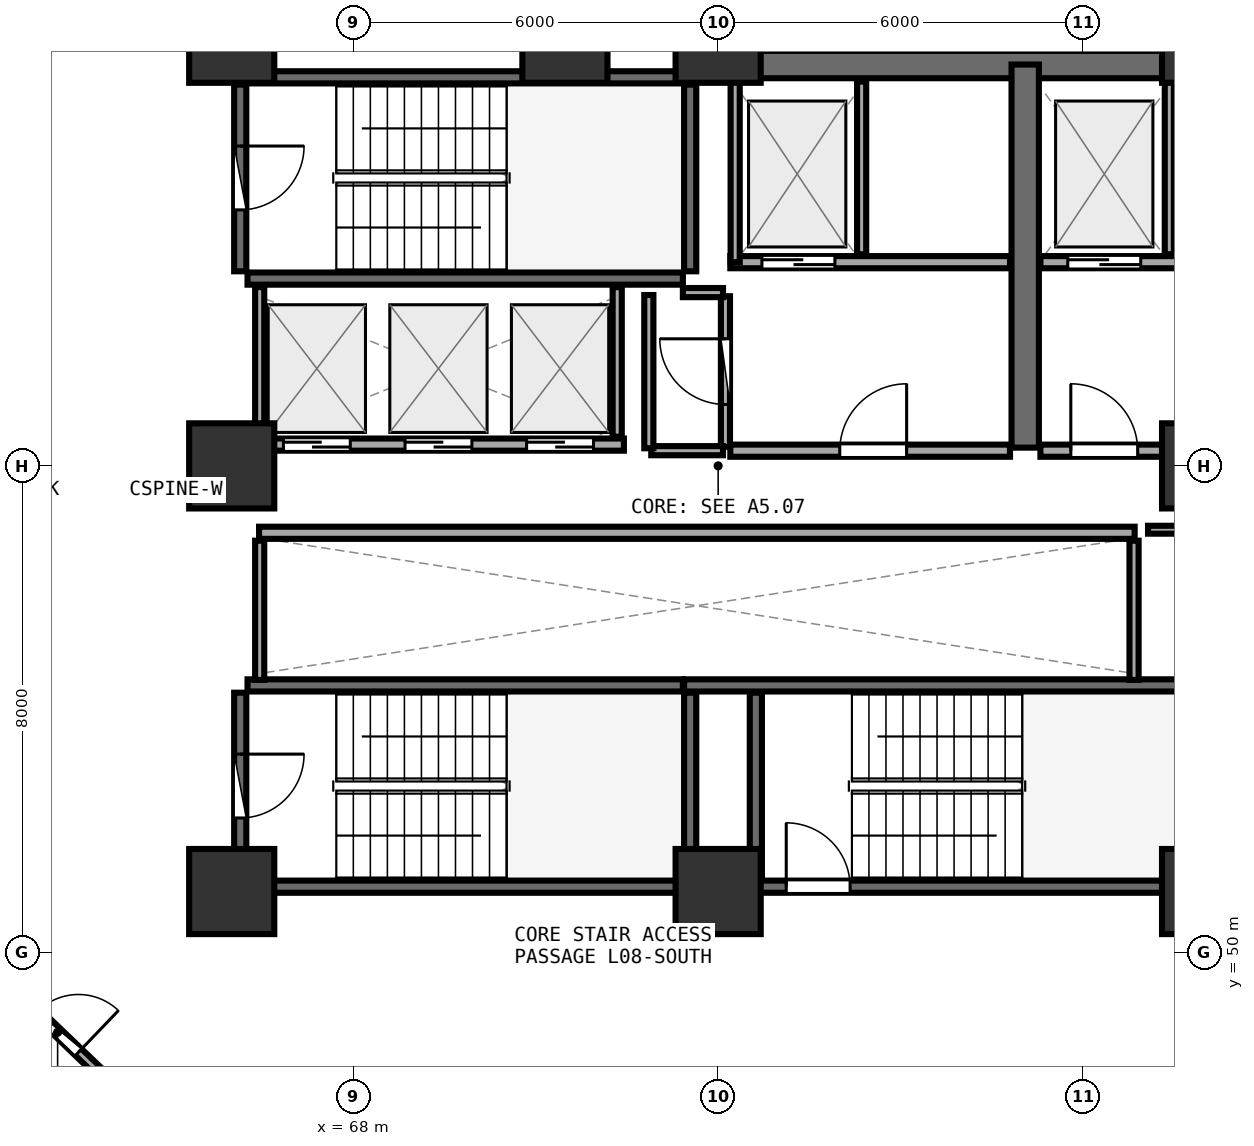
"""IFC4 building model, lengths in metres.
Left out: names, types, materials, properties, quantities, classifications, styles, units other than length and angle.
Written with IfcOpenShell. Run it as: python <this file> out.ifc"""

import sys

from ifc_helpers import new_model, si_unit, direction, frame, frame_2d, origin, origin_2d, place, context, subcontext, project, spatial, rectangle, extrude, element, fill, save


model = new_model("IFC4")
c1 = context("Model", 3, precision=1e-05, world=origin(), true_north=direction((0.0, 1.0)))
c2 = subcontext(c1, "Body", "Model", "MODEL_VIEW")
j1 = project(units=[si_unit("LENGTHUNIT", "METRE"), si_unit("PLANEANGLEUNIT", "RADIAN")], contexts=[c1])
p1 = place(None, origin())
s1 = spatial("IfcSite", under=j1, at=p1, CompositionType="ELEMENT")
p2 = place(p1, origin())
s2 = spatial("IfcBuilding", under=s1, at=p2, CompositionType="ELEMENT")
p3 = place(p2, frame((0.0, 0.0, 33.75)))
s3 = spatial("IfcBuildingStorey", under=s2, at=p3, CompositionType="ELEMENT", Elevation=33.75)
for number, where, z_axis, x_axis in (
    (1, (66.0, 51.0, 0.0), (0.0, 0.0, 1.0), (1.0, 0.0, 0.0)),
    (2, (74.0, 51.0, 0.0), (0.0, 0.0, 1.0), (1.0, 0.0, 0.0)),
    (3, (82.0, 51.0, 0.0), (0.0, 0.0, 1.0), (1.0, 0.0, 0.0)),
    (4, (82.0, 58.0, 0.0), (0.0, 0.0, 1.0), (1.0, 0.0, 0.0)),
    (5, (82.0, 65.0, 0.0), (0.0, 0.0, 1.0), (1.0, 0.0, 0.0)),
    (6, (74.0, 65.0, 0.0), (0.0, 0.0, 1.0), (1.0, 0.0, 0.0)),
    (7, (71.48, 65.0, 0.0), (0.0, 0.0, 1.0), (1.0, 0.0, 0.0)),
    (8, (66.0, 65.0, 0.0), (0.0, 0.0, 1.0), (1.0, 0.0, 0.0)),
    (9, (66.0, 58.0, 0.0), (0.0, 0.0, 1.0), (1.0, 0.0, 0.0)),
):
    element("IfcColumn", number, at=place(p3, frame(where, z_axis=z_axis, x_axis=x_axis)), inside=s3, PredefinedType="PILASTER", context=c2, shape_type="SweptSolid", body=[
        extrude(rectangle(XDim=1.4, YDim=1.4, at=origin_2d()), origin(), (0.0, 0.0, 1.0), 3.75),
    ])
p4 = place(p3, frame((66.26, 61.08, 0.0), z_axis=(0.0, 0.0, 1.0), x_axis=(1.0, 0.0, 0.0)))
e10 = element("IfcWall", 10, at=p4, inside=s3, PredefinedType="SHEAR", context=c2, shape_type="SweptSolid", body=[
    extrude(rectangle(XDim=7.16, YDim=0.2, at=frame_2d((3.58, 0.0))), origin(), (0.0, 0.0, 1.0), 3.49),
])
p5 = place(p3, frame((73.54, 61.2, 0.0), z_axis=(0.0, 0.0, 1.0), x_axis=(0.0, 1.0, 0.0)))
e11 = element("IfcWall", 11, at=p5, inside=s3, PredefinedType="SHEAR", context=c2, shape_type="SweptSolid", body=[
    extrude(rectangle(XDim=3.07, YDim=0.2, at=frame_2d((1.535, 0.0))), origin(), (0.0, 0.0, 1.0), 3.49),
])
p6 = place(p3, frame((73.42, 64.39, 0.0), z_axis=(0.0, 0.0, 1.0), x_axis=(-1.0, 0.0, 0.0)))
e12 = element("IfcWall", 12, at=p6, inside=s3, PredefinedType="SHEAR", context=c2, shape_type="SweptSolid", body=[
    extrude(rectangle(XDim=7.16, YDim=0.2, at=frame_2d((3.58, 0.0))), origin(), (0.0, 0.0, 1.0), 3.49),
])
p7 = place(p3, frame((66.14, 64.27, 0.0), z_axis=(0.0, 0.0, 1.0), x_axis=(0.0, -1.0, 0.0)))
e13 = element("IfcWall", 13, at=p7, inside=s3, PredefinedType="SHEAR", context=c2, shape_type="SweptSolid", body=[
    extrude(rectangle(XDim=3.07, YDim=0.2, at=frame_2d((1.535, 0.0))), origin(), (0.0, 0.0, 1.0), 3.49),
])
p8 = place(p7, frame((1.01, 0.0, 0.0)))
e14 = element("IfcOpeningElement", 14, at=p8, cuts=e13, PredefinedType="OPENING", context=c2, shape_type="SweptSolid", body=[
    extrude(rectangle(XDim=1.05, YDim=2.1, at=frame_2d((0.525, 1.05))), frame((0.0, 0.11, 0.0), z_axis=(0.0, -1.0, 0.0), x_axis=(1.0, 0.0, 0.0)), (0.0, 0.0, 1.0), 0.22),
])
p9 = place(p3, frame((74.0, 51.08, 0.0), z_axis=(0.0, 0.0, 1.0), x_axis=(1.0, 0.0, 0.0)))
e15 = element("IfcWall", 15, at=p9, inside=s3, PredefinedType="SHEAR", context=c2, shape_type="SweptSolid", body=[
    extrude(rectangle(XDim=7.9, YDim=0.2, at=frame_2d((3.95, 0.0))), origin(), (0.0, 0.0, 1.0), 3.49),
])
p10 = place(p9, frame((1.12, 0.0, 0.0)))
e16 = element("IfcOpeningElement", 16, at=p10, cuts=e15, PredefinedType="OPENING", context=c2, shape_type="SweptSolid", body=[
    extrude(rectangle(XDim=1.05, YDim=2.1, at=frame_2d((0.525, 1.05))), frame((0.0, 0.11, 0.0), z_axis=(0.0, -1.0, 0.0), x_axis=(1.0, 0.0, 0.0)), (0.0, 0.0, 1.0), 0.22),
])
p11 = place(p3, frame((81.9, 54.39, 0.0), z_axis=(0.0, 0.0, 1.0), x_axis=(-1.0, 0.0, 0.0)))
e17 = element("IfcWall", 17, at=p11, inside=s3, PredefinedType="SHEAR", context=c2, shape_type="SweptSolid", body=[
    extrude(rectangle(XDim=8.46, YDim=0.2, at=frame_2d((4.23, 0.0))), origin(), (0.0, 0.0, 1.0), 3.49),
])
p12 = place(p3, frame((74.62, 54.27, 0.0), z_axis=(0.0, 0.0, 1.0), x_axis=(0.0, -1.0, 0.0)))
e18 = element("IfcWall", 18, at=p12, inside=s3, PredefinedType="SHEAR", context=c2, shape_type="SweptSolid", body=[
    extrude(rectangle(XDim=3.07, YDim=0.2, at=frame_2d((1.535, 0.0))), origin(), (0.0, 0.0, 1.0), 3.49),
])
p13 = place(p3, frame((66.26, 51.08, 0.0), z_axis=(0.0, 0.0, 1.0), x_axis=(1.0, 0.0, 0.0)))
e19 = element("IfcWall", 19, at=p13, inside=s3, PredefinedType="SHEAR", context=c2, shape_type="SweptSolid", body=[
    extrude(rectangle(XDim=7.16, YDim=0.2, at=frame_2d((3.58, 0.0))), origin(), (0.0, 0.0, 1.0), 3.49),
])
p14 = place(p3, frame((73.54, 51.2, 0.0), z_axis=(0.0, 0.0, 1.0), x_axis=(0.0, 1.0, 0.0)))
e20 = element("IfcWall", 20, at=p14, inside=s3, PredefinedType="SHEAR", context=c2, shape_type="SweptSolid", body=[
    extrude(rectangle(XDim=3.07, YDim=0.2, at=frame_2d((1.535, 0.0))), origin(), (0.0, 0.0, 1.0), 3.49),
])
p15 = place(p3, frame((73.42, 54.39, 0.0), z_axis=(0.0, 0.0, 1.0), x_axis=(-1.0, 0.0, 0.0)))
e21 = element("IfcWall", 21, at=p15, inside=s3, PredefinedType="SHEAR", context=c2, shape_type="SweptSolid", body=[
    extrude(rectangle(XDim=7.16, YDim=0.2, at=frame_2d((3.58, 0.0))), origin(), (0.0, 0.0, 1.0), 3.49),
])
p16 = place(p3, frame((66.14, 54.27, 0.0), z_axis=(0.0, 0.0, 1.0), x_axis=(0.0, -1.0, 0.0)))
e22 = element("IfcWall", 22, at=p16, inside=s3, PredefinedType="SHEAR", context=c2, shape_type="SweptSolid", body=[
    extrude(rectangle(XDim=3.07, YDim=0.2, at=frame_2d((1.535, 0.0))), origin(), (0.0, 0.0, 1.0), 3.49),
])
p17 = place(p16, frame((1.01, 0.0, 0.0)))
e23 = element("IfcOpeningElement", 23, at=p17, cuts=e22, PredefinedType="OPENING", context=c2, shape_type="SweptSolid", body=[
    extrude(rectangle(XDim=1.05, YDim=2.1, at=frame_2d((0.525, 1.05))), frame((0.0, 0.11, 0.0), z_axis=(0.0, -1.0, 0.0), x_axis=(1.0, 0.0, 0.0)), (0.0, 0.0, 1.0), 0.22),
])
p18 = place(p3, frame((74.0, 64.6, 0.0), z_axis=(0.0, 0.0, 1.0), x_axis=(1.0, 0.0, 0.0)))
e24 = element("IfcWall", 24, at=p18, inside=s3, PredefinedType="SHEAR", context=c2, shape_type="SweptSolid", body=[
    extrude(rectangle(XDim=8.0, YDim=0.45, at=frame_2d((4.0, 0.0))), origin(), (0.0, 0.0, 1.0), 3.49),
])
p19 = place(p3, frame((79.05, 58.3, 0.0), z_axis=(0.0, 0.0, 1.0), x_axis=(0.0, 1.0, 0.0)))
e25 = element("IfcWall", 25, at=p19, inside=s3, PredefinedType="SHEAR", context=c2, shape_type="SweptSolid", body=[
    extrude(rectangle(XDim=6.3, YDim=0.45, at=frame_2d((3.15, 0.0))), origin(), (0.0, 0.0, 1.0), 3.49),
])
p20 = place(p3, frame((74.2, 61.35, 0.0), z_axis=(0.0, 0.0, 1.0), x_axis=(1.0, 0.0, 0.0)))
e26 = element("IfcWall", 26, at=p20, inside=s3, PredefinedType="SOLIDWALL", context=c2, shape_type="SweptSolid", body=[
    extrude(rectangle(XDim=4.6, YDim=0.2, at=frame_2d((2.3, 0.0))), origin(), (0.0, 0.0, 1.0), 3.48),
])
p21 = place(p20, frame((0.52, 0.0, 0.0)))
e27 = element("IfcOpeningElement", 27, at=p21, cuts=e26, PredefinedType="OPENING", context=c2, shape_type="SweptSolid", body=[
    extrude(rectangle(XDim=1.2, YDim=2.15, at=frame_2d((0.6, 1.075))), frame((0.0, 0.11, 0.0), z_axis=(0.0, -1.0, 0.0), x_axis=(1.0, 0.0, 0.0)), (0.0, 0.0, 1.0), 0.22),
])
p22 = place(p3, frame((74.28, 61.35, 0.0), z_axis=(0.0, 0.0, 1.0), x_axis=(0.0, 1.0, 0.0)))
e28 = element("IfcWall", 28, at=p22, inside=s3, PredefinedType="PARTITIONING", context=c2, shape_type="SweptSolid", body=[
    extrude(rectangle(XDim=2.97, YDim=0.15, at=frame_2d((1.485, 0.0))), origin(), (0.0, 0.0, 1.0), 3.48),
])
p23 = place(p3, frame((76.36, 61.48, 0.0), z_axis=(0.0, 0.0, 1.0), x_axis=(0.0, 1.0, 0.0)))
e29 = element("IfcWall", 29, at=p23, inside=s3, PredefinedType="PARTITIONING", context=c2, shape_type="SweptSolid", body=[
    extrude(rectangle(XDim=2.84, YDim=0.15, at=frame_2d((1.42, 0.0))), origin(), (0.0, 0.0, 1.0), 3.48),
])
p24 = place(p3, frame((79.3, 61.35, 0.0), z_axis=(0.0, 0.0, 1.0), x_axis=(1.0, 0.0, 0.0)))
e30 = element("IfcWall", 30, at=p24, inside=s3, PredefinedType="SOLIDWALL", context=c2, shape_type="SweptSolid", body=[
    extrude(rectangle(XDim=4.0, YDim=0.2, at=frame_2d((2.0, 0.0))), origin(), (0.0, 0.0, 1.0), 2.775),
])
p25 = place(p24, frame((0.45, 0.0, 0.0)))
e31 = element("IfcOpeningElement", 31, at=p25, cuts=e30, PredefinedType="OPENING", context=c2, shape_type="SweptSolid", body=[
    extrude(rectangle(XDim=1.2, YDim=2.15, at=frame_2d((0.6, 1.075))), frame((0.0, 0.11, 0.0), z_axis=(0.0, -1.0, 0.0), x_axis=(1.0, 0.0, 0.0)), (0.0, 0.0, 1.0), 0.22),
])
p26 = place(p3, frame((81.42, 61.48, 0.0), z_axis=(0.0, 0.0, 1.0), x_axis=(0.0, 1.0, 0.0)))
e32 = element("IfcWall", 32, at=p26, inside=s3, PredefinedType="PARTITIONING", context=c2, shape_type="SweptSolid", body=[
    extrude(rectangle(XDim=2.84, YDim=0.15, at=frame_2d((1.42, 0.0))), origin(), (0.0, 0.0, 1.0), 3.48),
])
p27 = place(p3, frame((74.2, 58.25, 0.0), z_axis=(0.0, 0.0, 1.0), x_axis=(1.0, 0.0, 0.0)))
e33 = element("IfcWall", 33, at=p27, inside=s3, PredefinedType="SOLIDWALL", context=c2, shape_type="SweptSolid", body=[
    extrude(rectangle(XDim=4.6, YDim=0.2, at=frame_2d((2.3, 0.0))), origin(), (0.0, 0.0, 1.0), 3.48),
])
p28 = place(p27, frame((1.8, 0.0, 0.0)))
e34 = element("IfcOpeningElement", 34, at=p28, cuts=e33, PredefinedType="OPENING", context=c2, shape_type="SweptSolid", body=[
    extrude(rectangle(XDim=1.1, YDim=2.1, at=frame_2d((0.55, 1.05))), frame((0.0, 0.11, 0.0), z_axis=(0.0, -1.0, 0.0), x_axis=(1.0, 0.0, 0.0)), (0.0, 0.0, 1.0), 0.22),
])
p29 = place(p3, frame((79.3, 58.25, 0.0), z_axis=(0.0, 0.0, 1.0), x_axis=(1.0, 0.0, 0.0)))
e35 = element("IfcWall", 35, at=p29, inside=s3, PredefinedType="SOLIDWALL", context=c2, shape_type="SweptSolid", body=[
    extrude(rectangle(XDim=4.0, YDim=0.2, at=frame_2d((2.0, 0.0))), origin(), (0.0, 0.0, 1.0), 2.775),
])
p30 = place(p29, frame((0.5, 0.0, 0.0)))
e36 = element("IfcOpeningElement", 36, at=p30, cuts=e35, PredefinedType="OPENING", context=c2, shape_type="SweptSolid", body=[
    extrude(rectangle(XDim=1.1, YDim=2.1, at=frame_2d((0.55, 1.05))), frame((0.0, 0.11, 0.0), z_axis=(0.0, -1.0, 0.0), x_axis=(1.0, 0.0, 0.0)), (0.0, 0.0, 1.0), 0.22),
])
p31 = place(p3, frame((66.45, 58.35, 0.0), z_axis=(0.0, 0.0, 1.0), x_axis=(1.0, 0.0, 0.0)))
e37 = element("IfcWall", 37, at=p31, inside=s3, PredefinedType="SOLIDWALL", context=c2, shape_type="SweptSolid", body=[
    extrude(rectangle(XDim=6.0, YDim=0.2, at=frame_2d((3.0, 0.0))), origin(), (0.0, 0.0, 1.0), 3.48),
])
p32 = place(p31, frame((0.4, 0.0, 0.0)))
e38 = element("IfcOpeningElement", 38, at=p32, cuts=e37, PredefinedType="OPENING", context=c2, shape_type="SweptSolid", body=[
    extrude(rectangle(XDim=1.1, YDim=2.1, at=frame_2d((0.55, 1.05))), frame((0.0, 0.11, 0.0), z_axis=(0.0, -1.0, 0.0), x_axis=(1.0, 0.0, 0.0)), (0.0, 0.0, 1.0), 0.22),
])
p33 = place(p31, frame((2.4, 0.0, 0.0)))
e39 = element("IfcOpeningElement", 39, at=p33, cuts=e37, PredefinedType="OPENING", context=c2, shape_type="SweptSolid", body=[
    extrude(rectangle(XDim=1.1, YDim=2.1, at=frame_2d((0.55, 1.05))), frame((0.0, 0.11, 0.0), z_axis=(0.0, -1.0, 0.0), x_axis=(1.0, 0.0, 0.0)), (0.0, 0.0, 1.0), 0.22),
])
p34 = place(p31, frame((4.4, 0.0, 0.0)))
e40 = element("IfcOpeningElement", 40, at=p34, cuts=e37, PredefinedType="OPENING", context=c2, shape_type="SweptSolid", body=[
    extrude(rectangle(XDim=1.1, YDim=2.1, at=frame_2d((0.55, 1.05))), frame((0.0, 0.11, 0.0), z_axis=(0.0, -1.0, 0.0), x_axis=(1.0, 0.0, 0.0)), (0.0, 0.0, 1.0), 0.22),
])
for number, where, z_axis, x_axis in (
    (41, (66.46, 58.48, 0.0), (0.0, 0.0, 1.0), (0.0, 1.0, 0.0)),
    (42, (72.34, 58.48, 0.0), (0.0, 0.0, 1.0), (0.0, 1.0, 0.0)),
):
    element("IfcWall", number, at=place(p3, frame(where, z_axis=z_axis, x_axis=x_axis)), inside=s3, PredefinedType="PARTITIONING", context=c2, shape_type="SweptSolid", body=[
        extrude(rectangle(XDim=2.46, YDim=0.15, at=frame_2d((1.23, 0.0))), origin(), (0.0, 0.0, 1.0), 3.48),
    ])
p35 = place(p3, frame((66.45, 56.9, 0.0), z_axis=(0.0, 0.0, 1.0), x_axis=(1.0, 0.0, 0.0)))
e43 = element("IfcWall", 43, at=p35, inside=s3, PredefinedType="SOLIDWALL", context=c2, shape_type="SweptSolid", body=[
    extrude(rectangle(XDim=14.4, YDim=0.2, at=frame_2d((7.2, 0.0))), origin(), (0.0, 0.0, 1.0), 3.48),
])
for number, where, z_axis, x_axis in (
    (44, (66.46, 54.48, 0.0), (0.0, 0.0, 1.0), (0.0, 1.0, 0.0)),
    (45, (80.84, 54.48, 0.0), (0.0, 0.0, 1.0), (0.0, 1.0, 0.0)),
):
    element("IfcWall", number, at=place(p3, frame(where, z_axis=z_axis, x_axis=x_axis)), inside=s3, PredefinedType="PARTITIONING", context=c2, shape_type="SweptSolid", body=[
        extrude(rectangle(XDim=2.29, YDim=0.15, at=frame_2d((1.145, 0.0))), origin(), (0.0, 0.0, 1.0), 3.48),
    ])
p36 = place(p3, frame((74.12, 58.31, 0.0), z_axis=(0.0, 0.0, 1.0), x_axis=(0.0, 1.0, 0.0)))
e46 = element("IfcWall", 46, at=p36, inside=s3, PredefinedType="PARTITIONING", context=c2, shape_type="SweptSolid", body=[
    extrude(rectangle(XDim=2.48, YDim=0.15, at=frame_2d((1.24, 0.0))), origin(), (0.0, 0.0, 1.0), 3.48),
])
p37 = place(p36, frame((0.7, 0.0, 0.0)))
e47 = element("IfcOpeningElement", 47, at=p37, cuts=e46, PredefinedType="OPENING", context=c2, shape_type="SweptSolid", body=[
    extrude(rectangle(XDim=1.08, YDim=2.1, at=frame_2d((0.54, 1.05))), frame((0.0, 0.085, 0.0), z_axis=(0.0, -1.0, 0.0), x_axis=(1.0, 0.0, 0.0)), (0.0, 0.0, 1.0), 0.17),
])
p38 = place(p3, frame((62.118, 49.663, 0.0), z_axis=(0.0, 0.0, 1.0), x_axis=(0.721698326825, -0.692207718144, 0.0)))
e48 = element("IfcWall", 48, at=p38, inside=s3, PredefinedType="PARTITIONING", context=c2, shape_type="SweptSolid", body=[
    extrude(rectangle(XDim=2.823, YDim=0.15, at=frame_2d((1.412, 0.0))), origin(), (0.0, 0.0, 1.0), 2.875),
])
p39 = place(p38, frame((0.936, 0.0, 0.0)))
e49 = element("IfcOpeningElement", 49, at=p39, cuts=e48, PredefinedType="OPENING", context=c2, shape_type="SweptSolid", body=[
    extrude(rectangle(XDim=0.95, YDim=2.08, at=frame_2d((0.475, 1.04))), frame((0.0, 0.085, 0.0), z_axis=(0.0, -1.0, 0.0), x_axis=(1.0, 0.0, 0.0)), (0.0, 0.0, 1.0), 0.17),
])
p40 = place(p3, frame((72.9, 58.25, 0.0), z_axis=(0.0, 0.0, 1.0), x_axis=(1.0, 0.0, 0.0)))
e50 = element("IfcWall", 50, at=p40, inside=s3, PredefinedType="PARTITIONING", context=c2, shape_type="SweptSolid", body=[
    extrude(rectangle(XDim=1.18, YDim=0.15, at=frame_2d((0.59, 0.0))), origin(), (0.0, 0.0, 1.0), 3.48),
])
p41 = place(p3, frame((74.08, 60.85, 0.0), z_axis=(0.0, 0.0, 1.0), x_axis=(-1.0, 0.0, 0.0)))
e51 = element("IfcWall", 51, at=p41, inside=s3, PredefinedType="PARTITIONING", context=c2, shape_type="SweptSolid", body=[
    extrude(rectangle(XDim=0.66, YDim=0.15, at=frame_2d((0.33, 0.0))), origin(), (0.0, 0.0, 1.0), 3.48),
])
p42 = place(p3, frame((72.86, 60.81, 0.0), z_axis=(0.0, 0.0, 1.0), x_axis=(0.0, -1.0, 0.0)))
e52 = element("IfcWall", 52, at=p42, inside=s3, PredefinedType="PARTITIONING", context=c2, shape_type="SweptSolid", body=[
    extrude(rectangle(XDim=2.52, YDim=0.15, at=frame_2d((1.26, 0.0))), origin(), (0.0, 0.0, 1.0), 3.48),
])
p43 = place(p3, frame((82.66, 56.95, 0.0), z_axis=(0.0, 0.0, 1.0), x_axis=(-1.0, 0.0, 0.0)))
e53 = element("IfcWall", 53, at=p43, inside=s3, PredefinedType="PLUMBINGWALL", context=c2, shape_type="SweptSolid", body=[
    extrude(rectangle(XDim=1.59, YDim=0.13, at=frame_2d((0.795, 0.0))), origin(), (0.0, 0.0, 1.0), 2.775),
])
p44 = place(p8, origin())
e54 = element("IfcDoor", 54, at=p44, inside=s3, OperationType="SINGLE_SWING_LEFT", PredefinedType="DOOR", context=c2, shape_type="SweptSolid", body=[
    extrude(rectangle(XDim=1.05, YDim=2.1, at=frame_2d((0.525, 1.05))), frame((0.0, 0.025, 0.0), z_axis=(0.0, -1.0, 0.0), x_axis=(1.0, 0.0, 0.0)), (0.0, 0.0, 1.0), 0.05),
])
fill(e14, e54)
p45 = place(p10, origin())
e55 = element("IfcDoor", 55, at=p45, inside=s3, OperationType="SINGLE_SWING_LEFT", PredefinedType="DOOR", context=c2, shape_type="SweptSolid", body=[
    extrude(rectangle(XDim=1.05, YDim=2.1, at=frame_2d((0.525, 1.05))), frame((0.0, 0.025, 0.0), z_axis=(0.0, -1.0, 0.0), x_axis=(1.0, 0.0, 0.0)), (0.0, 0.0, 1.0), 0.05),
])
fill(e16, e55)
p46 = place(p17, origin())
e56 = element("IfcDoor", 56, at=p46, inside=s3, OperationType="SINGLE_SWING_LEFT", PredefinedType="DOOR", context=c2, shape_type="SweptSolid", body=[
    extrude(rectangle(XDim=1.05, YDim=2.1, at=frame_2d((0.525, 1.05))), frame((0.0, 0.025, 0.0), z_axis=(0.0, -1.0, 0.0), x_axis=(1.0, 0.0, 0.0)), (0.0, 0.0, 1.0), 0.05),
])
fill(e23, e56)
p47 = place(p21, origin())
e57 = element("IfcDoor", 57, at=p47, inside=s3, OperationType="DOUBLE_DOOR_SLIDING", PredefinedType="DOOR", context=c2, shape_type="SweptSolid", body=[
    extrude(rectangle(XDim=1.2, YDim=2.15, at=frame_2d((0.6, 1.075))), frame((0.0, 0.025, 0.0), z_axis=(0.0, -1.0, 0.0), x_axis=(1.0, 0.0, 0.0)), (0.0, 0.0, 1.0), 0.05),
])
fill(e27, e57)
p48 = place(p25, origin())
e58 = element("IfcDoor", 58, at=p48, inside=s3, OperationType="DOUBLE_DOOR_SLIDING", PredefinedType="DOOR", context=c2, shape_type="SweptSolid", body=[
    extrude(rectangle(XDim=1.2, YDim=2.15, at=frame_2d((0.6, 1.075))), frame((0.0, 0.025, 0.0), z_axis=(0.0, -1.0, 0.0), x_axis=(1.0, 0.0, 0.0)), (0.0, 0.0, 1.0), 0.05),
])
fill(e31, e58)
p49 = place(p28, frame((1.1, 0.0, 0.0), z_axis=(0.0, 0.0, 1.0), x_axis=(-1.0, 0.0, 0.0)))
e59 = element("IfcDoor", 59, at=p49, inside=s3, OperationType="SINGLE_SWING_LEFT", PredefinedType="DOOR", context=c2, shape_type="SweptSolid", body=[
    extrude(rectangle(XDim=1.1, YDim=2.1, at=frame_2d((0.55, 1.05))), frame((0.0, 0.025, 0.0), z_axis=(0.0, -1.0, 0.0), x_axis=(1.0, 0.0, 0.0)), (0.0, 0.0, 1.0), 0.05),
])
fill(e34, e59)
p50 = place(p30, frame((1.1, 0.0, 0.0), z_axis=(0.0, 0.0, 1.0), x_axis=(-1.0, 0.0, 0.0)))
e60 = element("IfcDoor", 60, at=p50, inside=s3, OperationType="SINGLE_SWING_RIGHT", PredefinedType="DOOR", context=c2, shape_type="SweptSolid", body=[
    extrude(rectangle(XDim=1.1, YDim=2.1, at=frame_2d((0.55, 1.05))), frame((0.0, 0.025, 0.0), z_axis=(0.0, -1.0, 0.0), x_axis=(1.0, 0.0, 0.0)), (0.0, 0.0, 1.0), 0.05),
])
fill(e36, e60)
p51 = place(p32, origin())
e61 = element("IfcDoor", 61, at=p51, inside=s3, OperationType="DOUBLE_DOOR_SLIDING", PredefinedType="DOOR", context=c2, shape_type="SweptSolid", body=[
    extrude(rectangle(XDim=1.1, YDim=2.1, at=frame_2d((0.55, 1.05))), frame((0.0, 0.025, 0.0), z_axis=(0.0, -1.0, 0.0), x_axis=(1.0, 0.0, 0.0)), (0.0, 0.0, 1.0), 0.05),
])
fill(e38, e61)
p52 = place(p33, origin())
e62 = element("IfcDoor", 62, at=p52, inside=s3, OperationType="DOUBLE_DOOR_SLIDING", PredefinedType="DOOR", context=c2, shape_type="SweptSolid", body=[
    extrude(rectangle(XDim=1.1, YDim=2.1, at=frame_2d((0.55, 1.05))), frame((0.0, 0.025, 0.0), z_axis=(0.0, -1.0, 0.0), x_axis=(1.0, 0.0, 0.0)), (0.0, 0.0, 1.0), 0.05),
])
fill(e39, e62)
p53 = place(p34, origin())
e63 = element("IfcDoor", 63, at=p53, inside=s3, OperationType="DOUBLE_DOOR_SLIDING", PredefinedType="DOOR", context=c2, shape_type="SweptSolid", body=[
    extrude(rectangle(XDim=1.1, YDim=2.1, at=frame_2d((0.55, 1.05))), frame((0.0, 0.025, 0.0), z_axis=(0.0, -1.0, 0.0), x_axis=(1.0, 0.0, 0.0)), (0.0, 0.0, 1.0), 0.05),
])
fill(e40, e63)
p54 = place(p37, origin())
e64 = element("IfcDoor", 64, at=p54, inside=s3, OperationType="SINGLE_SWING_RIGHT", PredefinedType="DOOR", context=c2, shape_type="SweptSolid", body=[
    extrude(rectangle(XDim=1.08, YDim=2.1, at=frame_2d((0.54, 1.05))), frame((0.0, 0.025, 0.0), z_axis=(0.0, -1.0, 0.0), x_axis=(1.0, 0.0, 0.0)), (0.0, 0.0, 1.0), 0.05),
])
fill(e47, e64)
p55 = place(p39, origin())
e65 = element("IfcDoor", 65, at=p55, inside=s3, OperationType="SINGLE_SWING_RIGHT", PredefinedType="DOOR", context=c2, shape_type="SweptSolid", body=[
    extrude(rectangle(XDim=0.95, YDim=2.08, at=frame_2d((0.475, 1.04))), frame((0.0, 0.025, 0.0), z_axis=(0.0, -1.0, 0.0), x_axis=(1.0, 0.0, 0.0)), (0.0, 0.0, 1.0), 0.05),
])
fill(e49, e65)
save(model, sys.argv[1])
